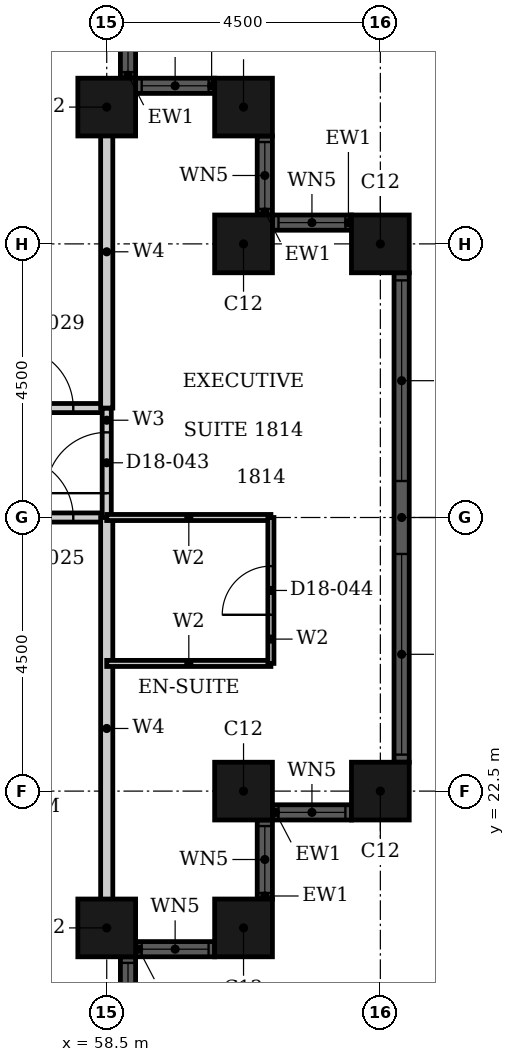
"""IFC4 building model, lengths in metres.
Left out: names, types, materials, properties, quantities, classifications, styles, units other than length and angle.
Written with IfcOpenShell. Run it as: python <this file> out.ifc"""

import sys

from ifc_helpers import new_model, si_unit, direction, frame, frame_2d, origin, origin_2d, place, context, subcontext, project, spatial, rectangle, hollow_rectangle, extrude, element, fill, save


model = new_model("IFC4")
c1 = context("Model", 3, precision=1e-05, world=origin(), true_north=direction((0.0, 1.0)))
c2 = subcontext(c1, "Body", "Model", "MODEL_VIEW")
j1 = project(units=[si_unit("LENGTHUNIT", "METRE"), si_unit("PLANEANGLEUNIT", "RADIAN")], contexts=[c1])
p1 = place(None, origin())
s1 = spatial("IfcSite", under=j1, at=p1, CompositionType="ELEMENT")
p2 = place(p1, origin())
s2 = spatial("IfcBuilding", under=s1, at=p2, CompositionType="ELEMENT")
p3 = place(p2, frame((0.0, 0.0, 78.0)))
s3 = spatial("IfcBuildingStorey", under=s2, at=p3, CompositionType="ELEMENT", Elevation=78.0)
for number, where, z_axis, x_axis in (
    (1, (58.5, 20.25, 0.0), (0.0, 0.0, 1.0), (1.0, 0.0, 0.0)),
    (2, (60.75, 20.25, 0.0), (0.0, 0.0, 1.0), (1.0, 0.0, 0.0)),
    (3, (60.75, 22.5, 0.0), (0.0, 0.0, 1.0), (1.0, 0.0, 0.0)),
    (4, (63.0, 22.5, 0.0), (0.0, 0.0, 1.0), (1.0, 0.0, 0.0)),
    (5, (63.0, 31.5, 0.0), (0.0, 0.0, 1.0), (1.0, 0.0, 0.0)),
    (6, (60.75, 31.5, 0.0), (0.0, 0.0, 1.0), (1.0, 0.0, 0.0)),
    (7, (60.75, 33.75, 0.0), (0.0, 0.0, 1.0), (1.0, 0.0, 0.0)),
    (8, (58.5, 33.75, 0.0), (0.0, 0.0, 1.0), (1.0, 0.0, 0.0)),
):
    element("IfcColumn", number, at=place(p3, frame(where, z_axis=z_axis, x_axis=x_axis)), inside=s3, PredefinedType="COLUMN", context=c2, shape_type="SweptSolid", body=[
        extrude(hollow_rectangle(XDim=0.95, YDim=0.95, WallThickness=0.03, at=origin_2d()), origin(), (0.0, 0.0, 1.0), 3.6),
    ])
p4 = place(p3, frame((58.85, 18.475, 0.0), z_axis=(0.0, 0.0, 1.0), x_axis=(0.0, 1.0, 0.0)))
e9 = element("IfcWall", 9, at=p4, inside=s3, PredefinedType="SOLIDWALL", context=c2, shape_type="SweptSolid", body=[
    extrude(rectangle(XDim=1.3, YDim=0.25, at=frame_2d((0.65, 0.0))), origin(), (0.0, 0.0, 1.0), 3.6),
])
p5 = place(p4, frame((0.1, 0.0, 0.9)))
e10 = element("IfcOpeningElement", 10, at=p5, cuts=e9, PredefinedType="OPENING", context=c2, shape_type="SweptSolid", body=[
    extrude(rectangle(XDim=1.1, YDim=2.08, at=frame_2d((0.55, 1.04))), frame((0.0, 0.135, 0.0), z_axis=(0.0, -1.0, 0.0), x_axis=(1.0, 0.0, 0.0)), (0.0, 0.0, 1.0), 0.27),
])
p6 = place(p3, frame((58.975, 19.9, 0.0), z_axis=(0.0, 0.0, 1.0), x_axis=(1.0, 0.0, 0.0)))
e11 = element("IfcWall", 11, at=p6, inside=s3, PredefinedType="SOLIDWALL", context=c2, shape_type="SweptSolid", body=[
    extrude(rectangle(XDim=1.3, YDim=0.25, at=frame_2d((0.65, 0.0))), origin(), (0.0, 0.0, 1.0), 3.6),
])
p7 = place(p6, frame((0.1, 0.0, 0.9)))
e12 = element("IfcOpeningElement", 12, at=p7, cuts=e11, PredefinedType="OPENING", context=c2, shape_type="SweptSolid", body=[
    extrude(rectangle(XDim=1.1, YDim=2.08, at=frame_2d((0.55, 1.04))), frame((0.0, 0.135, 0.0), z_axis=(0.0, -1.0, 0.0), x_axis=(1.0, 0.0, 0.0)), (0.0, 0.0, 1.0), 0.27),
])
p8 = place(p3, frame((61.1, 20.725, 0.0), z_axis=(0.0, 0.0, 1.0), x_axis=(0.0, 1.0, 0.0)))
e13 = element("IfcWall", 13, at=p8, inside=s3, PredefinedType="SOLIDWALL", context=c2, shape_type="SweptSolid", body=[
    extrude(rectangle(XDim=1.3, YDim=0.25, at=frame_2d((0.65, 0.0))), origin(), (0.0, 0.0, 1.0), 3.6),
])
p9 = place(p8, frame((0.1, 0.0, 0.9)))
e14 = element("IfcOpeningElement", 14, at=p9, cuts=e13, PredefinedType="OPENING", context=c2, shape_type="SweptSolid", body=[
    extrude(rectangle(XDim=1.1, YDim=2.08, at=frame_2d((0.55, 1.04))), frame((0.0, 0.135, 0.0), z_axis=(0.0, -1.0, 0.0), x_axis=(1.0, 0.0, 0.0)), (0.0, 0.0, 1.0), 0.27),
])
p10 = place(p3, frame((61.225, 22.15, 0.0), z_axis=(0.0, 0.0, 1.0), x_axis=(1.0, 0.0, 0.0)))
e15 = element("IfcWall", 15, at=p10, inside=s3, PredefinedType="SOLIDWALL", context=c2, shape_type="SweptSolid", body=[
    extrude(rectangle(XDim=1.3, YDim=0.25, at=frame_2d((0.65, 0.0))), origin(), (0.0, 0.0, 1.0), 3.6),
])
p11 = place(p10, frame((0.1, 0.0, 0.9)))
e16 = element("IfcOpeningElement", 16, at=p11, cuts=e15, PredefinedType="OPENING", context=c2, shape_type="SweptSolid", body=[
    extrude(rectangle(XDim=1.1, YDim=2.08, at=frame_2d((0.55, 1.04))), frame((0.0, 0.135, 0.0), z_axis=(0.0, -1.0, 0.0), x_axis=(1.0, 0.0, 0.0)), (0.0, 0.0, 1.0), 0.27),
])
p12 = place(p3, frame((63.35, 22.975, 0.0), z_axis=(0.0, 0.0, 1.0), x_axis=(0.0, 1.0, 0.0)))
e17 = element("IfcWall", 17, at=p12, inside=s3, PredefinedType="SOLIDWALL", context=c2, shape_type="SweptSolid", body=[
    extrude(rectangle(XDim=8.05, YDim=0.25, at=frame_2d((4.025, 0.0))), origin(), (0.0, 0.0, 1.0), 3.6),
])
p13 = place(p12, frame((0.125, 0.0, 0.9)))
e18 = element("IfcOpeningElement", 18, at=p13, cuts=e17, PredefinedType="OPENING", context=c2, shape_type="SweptSolid", body=[
    extrude(rectangle(XDim=3.3, YDim=2.08, at=frame_2d((1.65, 1.04))), frame((0.0, 0.135, 0.0), z_axis=(0.0, -1.0, 0.0), x_axis=(1.0, 0.0, 0.0)), (0.0, 0.0, 1.0), 0.27),
])
p14 = place(p12, frame((4.625, 0.0, 0.9)))
e19 = element("IfcOpeningElement", 19, at=p14, cuts=e17, PredefinedType="OPENING", context=c2, shape_type="SweptSolid", body=[
    extrude(rectangle(XDim=3.3, YDim=2.08, at=frame_2d((1.65, 1.04))), frame((0.0, 0.135, 0.0), z_axis=(0.0, -1.0, 0.0), x_axis=(1.0, 0.0, 0.0)), (0.0, 0.0, 1.0), 0.27),
])
p15 = place(p3, frame((62.525, 31.85, 0.0), z_axis=(0.0, 0.0, 1.0), x_axis=(-1.0, 0.0, 0.0)))
e20 = element("IfcWall", 20, at=p15, inside=s3, PredefinedType="SOLIDWALL", context=c2, shape_type="SweptSolid", body=[
    extrude(rectangle(XDim=1.3, YDim=0.25, at=frame_2d((0.65, 0.0))), origin(), (0.0, 0.0, 1.0), 3.6),
])
p16 = place(p15, frame((0.1, 0.0, 0.9)))
e21 = element("IfcOpeningElement", 21, at=p16, cuts=e20, PredefinedType="OPENING", context=c2, shape_type="SweptSolid", body=[
    extrude(rectangle(XDim=1.1, YDim=2.08, at=frame_2d((0.55, 1.04))), frame((0.0, 0.135, 0.0), z_axis=(0.0, -1.0, 0.0), x_axis=(1.0, 0.0, 0.0)), (0.0, 0.0, 1.0), 0.27),
])
p17 = place(p3, frame((61.1, 31.975, 0.0), z_axis=(0.0, 0.0, 1.0), x_axis=(0.0, 1.0, 0.0)))
e22 = element("IfcWall", 22, at=p17, inside=s3, PredefinedType="SOLIDWALL", context=c2, shape_type="SweptSolid", body=[
    extrude(rectangle(XDim=1.3, YDim=0.25, at=frame_2d((0.65, 0.0))), origin(), (0.0, 0.0, 1.0), 3.6),
])
p18 = place(p17, frame((0.1, 0.0, 0.9)))
e23 = element("IfcOpeningElement", 23, at=p18, cuts=e22, PredefinedType="OPENING", context=c2, shape_type="SweptSolid", body=[
    extrude(rectangle(XDim=1.1, YDim=2.08, at=frame_2d((0.55, 1.04))), frame((0.0, 0.135, 0.0), z_axis=(0.0, -1.0, 0.0), x_axis=(1.0, 0.0, 0.0)), (0.0, 0.0, 1.0), 0.27),
])
p19 = place(p3, frame((60.275, 34.1, 0.0), z_axis=(0.0, 0.0, 1.0), x_axis=(-1.0, 0.0, 0.0)))
e24 = element("IfcWall", 24, at=p19, inside=s3, PredefinedType="SOLIDWALL", context=c2, shape_type="SweptSolid", body=[
    extrude(rectangle(XDim=1.3, YDim=0.25, at=frame_2d((0.65, 0.0))), origin(), (0.0, 0.0, 1.0), 3.6),
])
p20 = place(p19, frame((0.1, 0.0, 0.9)))
e25 = element("IfcOpeningElement", 25, at=p20, cuts=e24, PredefinedType="OPENING", context=c2, shape_type="SweptSolid", body=[
    extrude(rectangle(XDim=1.1, YDim=2.08, at=frame_2d((0.55, 1.04))), frame((0.0, 0.135, 0.0), z_axis=(0.0, -1.0, 0.0), x_axis=(1.0, 0.0, 0.0)), (0.0, 0.0, 1.0), 0.27),
])
p21 = place(p3, frame((58.85, 34.225, 0.0), z_axis=(0.0, 0.0, 1.0), x_axis=(0.0, 1.0, 0.0)))
e26 = element("IfcWall", 26, at=p21, inside=s3, PredefinedType="SOLIDWALL", context=c2, shape_type="SweptSolid", body=[
    extrude(rectangle(XDim=1.3, YDim=0.25, at=frame_2d((0.65, 0.0))), origin(), (0.0, 0.0, 1.0), 3.6),
])
p22 = place(p21, frame((0.1, 0.0, 0.9)))
e27 = element("IfcOpeningElement", 27, at=p22, cuts=e26, PredefinedType="OPENING", context=c2, shape_type="SweptSolid", body=[
    extrude(rectangle(XDim=1.1, YDim=2.08, at=frame_2d((0.55, 1.04))), frame((0.0, 0.135, 0.0), z_axis=(0.0, -1.0, 0.0), x_axis=(1.0, 0.0, 0.0)), (0.0, 0.0, 1.0), 0.27),
])
p23 = place(p3, frame((46.8, 27.0, 0.0), z_axis=(0.0, 0.0, 1.0), x_axis=(1.0, 0.0, 0.0)))
e28 = element("IfcWall", 28, at=p23, inside=s3, PredefinedType="PARTITIONING", context=c2, shape_type="SweptSolid", body=[
    extrude(rectangle(XDim=11.7, YDim=0.15, at=frame_2d((5.85, 0.0))), origin(), (0.0, 0.0, 1.0), 2.58),
])
p24 = place(p23, frame((5.65, 0.0, 0.0)))
e29 = element("IfcOpeningElement", 29, at=p24, cuts=e28, PredefinedType="OPENING", context=c2, shape_type="SweptSolid", body=[
    extrude(rectangle(XDim=1.0, YDim=2.1, at=frame_2d((0.5, 1.05))), frame((0.0, 0.085, 0.0), z_axis=(0.0, -1.0, 0.0), x_axis=(1.0, 0.0, 0.0)), (0.0, 0.0, 1.0), 0.17),
])
p25 = place(p23, frame((10.15, 0.0, 0.0)))
e30 = element("IfcOpeningElement", 30, at=p25, cuts=e28, PredefinedType="OPENING", context=c2, shape_type="SweptSolid", body=[
    extrude(rectangle(XDim=1.0, YDim=2.1, at=frame_2d((0.5, 1.05))), frame((0.0, 0.085, 0.0), z_axis=(0.0, -1.0, 0.0), x_axis=(1.0, 0.0, 0.0)), (0.0, 0.0, 1.0), 0.17),
])
p26 = place(p3, frame((46.8, 28.8, 0.0), z_axis=(0.0, 0.0, 1.0), x_axis=(1.0, 0.0, 0.0)))
e31 = element("IfcWall", 31, at=p26, inside=s3, PredefinedType="PARTITIONING", context=c2, shape_type="SweptSolid", body=[
    extrude(rectangle(XDim=11.7, YDim=0.15, at=frame_2d((5.85, 0.0))), origin(), (0.0, 0.0, 1.0), 3.3),
])
p27 = place(p26, frame((5.65, 0.0, 0.0)))
e32 = element("IfcOpeningElement", 32, at=p27, cuts=e31, PredefinedType="OPENING", context=c2, shape_type="SweptSolid", body=[
    extrude(rectangle(XDim=1.0, YDim=2.1, at=frame_2d((0.5, 1.05))), frame((0.0, 0.085, 0.0), z_axis=(0.0, -1.0, 0.0), x_axis=(1.0, 0.0, 0.0)), (0.0, 0.0, 1.0), 0.17),
])
p28 = place(p26, frame((10.15, 0.0, 0.0)))
e33 = element("IfcOpeningElement", 33, at=p28, cuts=e31, PredefinedType="OPENING", context=c2, shape_type="SweptSolid", body=[
    extrude(rectangle(XDim=1.0, YDim=2.1, at=frame_2d((0.5, 1.05))), frame((0.0, 0.085, 0.0), z_axis=(0.0, -1.0, 0.0), x_axis=(1.0, 0.0, 0.0)), (0.0, 0.0, 1.0), 0.17),
])
p29 = place(p3, frame((58.5, 27.0, 0.0), z_axis=(0.0, 0.0, 1.0), x_axis=(0.0, 1.0, 0.0)))
e34 = element("IfcWall", 34, at=p29, inside=s3, PredefinedType="PARTITIONING", context=c2, shape_type="SweptSolid", body=[
    extrude(rectangle(XDim=1.8, YDim=0.15, at=frame_2d((0.9, 0.0))), origin(), (0.0, 0.0, 1.0), 3.3),
])
p30 = place(p29, frame((0.4, 0.0, 0.0)))
e35 = element("IfcOpeningElement", 35, at=p30, cuts=e34, PredefinedType="OPENING", context=c2, shape_type="SweptSolid", body=[
    extrude(rectangle(XDim=1.0, YDim=2.1, at=frame_2d((0.5, 1.05))), frame((0.0, 0.085, 0.0), z_axis=(0.0, -1.0, 0.0), x_axis=(1.0, 0.0, 0.0)), (0.0, 0.0, 1.0), 0.17),
])
p31 = place(p3, frame((58.5, 28.8, 0.0), z_axis=(0.0, 0.0, 1.0), x_axis=(0.0, 1.0, 0.0)))
e36 = element("IfcWall", 36, at=p31, inside=s3, PredefinedType="PARTITIONING", context=c2, shape_type="SweptSolid", body=[
    extrude(rectangle(XDim=5.14, YDim=0.2, at=frame_2d((2.57, 0.0))), origin(), (0.0, 0.0, 1.0), 3.3),
])
p32 = place(p3, frame((58.5, 20.06, 0.0), z_axis=(0.0, 0.0, 1.0), x_axis=(0.0, 1.0, 0.0)))
e37 = element("IfcWall", 37, at=p32, inside=s3, PredefinedType="PARTITIONING", context=c2, shape_type="SweptSolid", body=[
    extrude(rectangle(XDim=6.94, YDim=0.2, at=frame_2d((3.47, 0.0))), origin(), (0.0, 0.0, 1.0), 3.3),
])
p33 = place(p3, frame((58.5, 24.6, 0.0), z_axis=(0.0, 0.0, 1.0), x_axis=(1.0, 0.0, 0.0)))
e38 = element("IfcWall", 38, at=p33, inside=s3, PredefinedType="PARTITIONING", context=c2, shape_type="SweptSolid", body=[
    extrude(rectangle(XDim=2.7, YDim=0.1, at=frame_2d((1.35, 0.0))), origin(), (0.0, 0.0, 1.0), 3.3),
])
p34 = place(p3, frame((58.5, 27.0, 0.0), z_axis=(0.0, 0.0, 1.0), x_axis=(1.0, 0.0, 0.0)))
e39 = element("IfcWall", 39, at=p34, inside=s3, PredefinedType="PARTITIONING", context=c2, shape_type="SweptSolid", body=[
    extrude(rectangle(XDim=2.7, YDim=0.1, at=frame_2d((1.35, 0.0))), origin(), (0.0, 0.0, 1.0), 2.58),
])
p35 = place(p3, frame((61.2, 24.6, 0.0), z_axis=(0.0, 0.0, 1.0), x_axis=(0.0, 1.0, 0.0)))
e40 = element("IfcWall", 40, at=p35, inside=s3, PredefinedType="PARTITIONING", context=c2, shape_type="SweptSolid", body=[
    extrude(rectangle(XDim=2.4, YDim=0.1, at=frame_2d((1.2, 0.0))), origin(), (0.0, 0.0, 1.0), 3.3),
])
p36 = place(p35, frame((0.8, 0.0, 0.0)))
e41 = element("IfcOpeningElement", 41, at=p36, cuts=e40, PredefinedType="OPENING", context=c2, shape_type="SweptSolid", body=[
    extrude(rectangle(XDim=0.8, YDim=2.1, at=frame_2d((0.4, 1.05))), frame((0.0, 0.06, 0.0), z_axis=(0.0, -1.0, 0.0), x_axis=(1.0, 0.0, 0.0)), (0.0, 0.0, 1.0), 0.12),
])
p37 = place(p5, origin())
e42 = element("IfcWindow", 42, at=p37, inside=s3, PartitioningType="SINGLE_PANEL", PredefinedType="WINDOW", context=c2, shape_type="SweptSolid", body=[
    extrude(rectangle(XDim=1.1, YDim=2.08, at=frame_2d((0.55, 1.04))), frame((0.0, 0.03, 0.0), z_axis=(0.0, -1.0, 0.0), x_axis=(1.0, 0.0, 0.0)), (0.0, 0.0, 1.0), 0.06),
])
fill(e10, e42)
p38 = place(p7, origin())
e43 = element("IfcWindow", 43, at=p38, inside=s3, PartitioningType="SINGLE_PANEL", PredefinedType="WINDOW", context=c2, shape_type="SweptSolid", body=[
    extrude(rectangle(XDim=1.1, YDim=2.08, at=frame_2d((0.55, 1.04))), frame((0.0, 0.03, 0.0), z_axis=(0.0, -1.0, 0.0), x_axis=(1.0, 0.0, 0.0)), (0.0, 0.0, 1.0), 0.06),
])
fill(e12, e43)
p39 = place(p9, origin())
e44 = element("IfcWindow", 44, at=p39, inside=s3, PartitioningType="SINGLE_PANEL", PredefinedType="WINDOW", context=c2, shape_type="SweptSolid", body=[
    extrude(rectangle(XDim=1.1, YDim=2.08, at=frame_2d((0.55, 1.04))), frame((0.0, 0.03, 0.0), z_axis=(0.0, -1.0, 0.0), x_axis=(1.0, 0.0, 0.0)), (0.0, 0.0, 1.0), 0.06),
])
fill(e14, e44)
p40 = place(p11, origin())
e45 = element("IfcWindow", 45, at=p40, inside=s3, PartitioningType="SINGLE_PANEL", PredefinedType="WINDOW", context=c2, shape_type="SweptSolid", body=[
    extrude(rectangle(XDim=1.1, YDim=2.08, at=frame_2d((0.55, 1.04))), frame((0.0, 0.03, 0.0), z_axis=(0.0, -1.0, 0.0), x_axis=(1.0, 0.0, 0.0)), (0.0, 0.0, 1.0), 0.06),
])
fill(e16, e45)
p41 = place(p13, origin())
e46 = element("IfcWindow", 46, at=p41, inside=s3, PartitioningType="SINGLE_PANEL", PredefinedType="WINDOW", context=c2, shape_type="SweptSolid", body=[
    extrude(rectangle(XDim=3.3, YDim=2.08, at=frame_2d((1.65, 1.04))), frame((0.0, 0.03, 0.0), z_axis=(0.0, -1.0, 0.0), x_axis=(1.0, 0.0, 0.0)), (0.0, 0.0, 1.0), 0.06),
])
fill(e18, e46)
p42 = place(p14, origin())
e47 = element("IfcWindow", 47, at=p42, inside=s3, PartitioningType="SINGLE_PANEL", PredefinedType="WINDOW", context=c2, shape_type="SweptSolid", body=[
    extrude(rectangle(XDim=3.3, YDim=2.08, at=frame_2d((1.65, 1.04))), frame((0.0, 0.03, 0.0), z_axis=(0.0, -1.0, 0.0), x_axis=(1.0, 0.0, 0.0)), (0.0, 0.0, 1.0), 0.06),
])
fill(e19, e47)
p43 = place(p16, origin())
e48 = element("IfcWindow", 48, at=p43, inside=s3, PartitioningType="SINGLE_PANEL", PredefinedType="WINDOW", context=c2, shape_type="SweptSolid", body=[
    extrude(rectangle(XDim=1.1, YDim=2.08, at=frame_2d((0.55, 1.04))), frame((0.0, 0.03, 0.0), z_axis=(0.0, -1.0, 0.0), x_axis=(1.0, 0.0, 0.0)), (0.0, 0.0, 1.0), 0.06),
])
fill(e21, e48)
p44 = place(p18, origin())
e49 = element("IfcWindow", 49, at=p44, inside=s3, PartitioningType="SINGLE_PANEL", PredefinedType="WINDOW", context=c2, shape_type="SweptSolid", body=[
    extrude(rectangle(XDim=1.1, YDim=2.08, at=frame_2d((0.55, 1.04))), frame((0.0, 0.03, 0.0), z_axis=(0.0, -1.0, 0.0), x_axis=(1.0, 0.0, 0.0)), (0.0, 0.0, 1.0), 0.06),
])
fill(e23, e49)
p45 = place(p20, origin())
e50 = element("IfcWindow", 50, at=p45, inside=s3, PartitioningType="SINGLE_PANEL", PredefinedType="WINDOW", context=c2, shape_type="SweptSolid", body=[
    extrude(rectangle(XDim=1.1, YDim=2.08, at=frame_2d((0.55, 1.04))), frame((0.0, 0.03, 0.0), z_axis=(0.0, -1.0, 0.0), x_axis=(1.0, 0.0, 0.0)), (0.0, 0.0, 1.0), 0.06),
])
fill(e25, e50)
p46 = place(p22, origin())
e51 = element("IfcWindow", 51, at=p46, inside=s3, PartitioningType="SINGLE_PANEL", PredefinedType="WINDOW", context=c2, shape_type="SweptSolid", body=[
    extrude(rectangle(XDim=1.1, YDim=2.08, at=frame_2d((0.55, 1.04))), frame((0.0, 0.03, 0.0), z_axis=(0.0, -1.0, 0.0), x_axis=(1.0, 0.0, 0.0)), (0.0, 0.0, 1.0), 0.06),
])
fill(e27, e51)
p47 = place(p25, origin())
e52 = element("IfcDoor", 52, at=p47, inside=s3, OperationType="SINGLE_SWING_RIGHT", PredefinedType="DOOR", context=c2, shape_type="SweptSolid", body=[
    extrude(rectangle(XDim=1.0, YDim=2.1, at=frame_2d((0.5, 1.05))), frame((0.0, 0.025, 0.0), z_axis=(0.0, -1.0, 0.0), x_axis=(1.0, 0.0, 0.0)), (0.0, 0.0, 1.0), 0.05),
])
fill(e30, e52)
p48 = place(p28, origin())
e53 = element("IfcDoor", 53, at=p48, inside=s3, OperationType="SINGLE_SWING_RIGHT", PredefinedType="DOOR", context=c2, shape_type="SweptSolid", body=[
    extrude(rectangle(XDim=1.0, YDim=2.1, at=frame_2d((0.5, 1.05))), frame((0.0, 0.025, 0.0), z_axis=(0.0, -1.0, 0.0), x_axis=(1.0, 0.0, 0.0)), (0.0, 0.0, 1.0), 0.05),
])
fill(e33, e53)
p49 = place(p30, origin())
e54 = element("IfcDoor", 54, at=p49, inside=s3, OperationType="SINGLE_SWING_LEFT", PredefinedType="DOOR", context=c2, shape_type="SweptSolid", body=[
    extrude(rectangle(XDim=1.0, YDim=2.1, at=frame_2d((0.5, 1.05))), frame((0.0, 0.025, 0.0), z_axis=(0.0, -1.0, 0.0), x_axis=(1.0, 0.0, 0.0)), (0.0, 0.0, 1.0), 0.05),
])
fill(e35, e54)
p50 = place(p36, origin())
e55 = element("IfcDoor", 55, at=p50, inside=s3, OperationType="SINGLE_SWING_LEFT", PredefinedType="DOOR", context=c2, shape_type="SweptSolid", body=[
    extrude(rectangle(XDim=0.8, YDim=2.1, at=frame_2d((0.4, 1.05))), frame((0.0, 0.025, 0.0), z_axis=(0.0, -1.0, 0.0), x_axis=(1.0, 0.0, 0.0)), (0.0, 0.0, 1.0), 0.05),
])
fill(e41, e55)
save(model, sys.argv[1])
